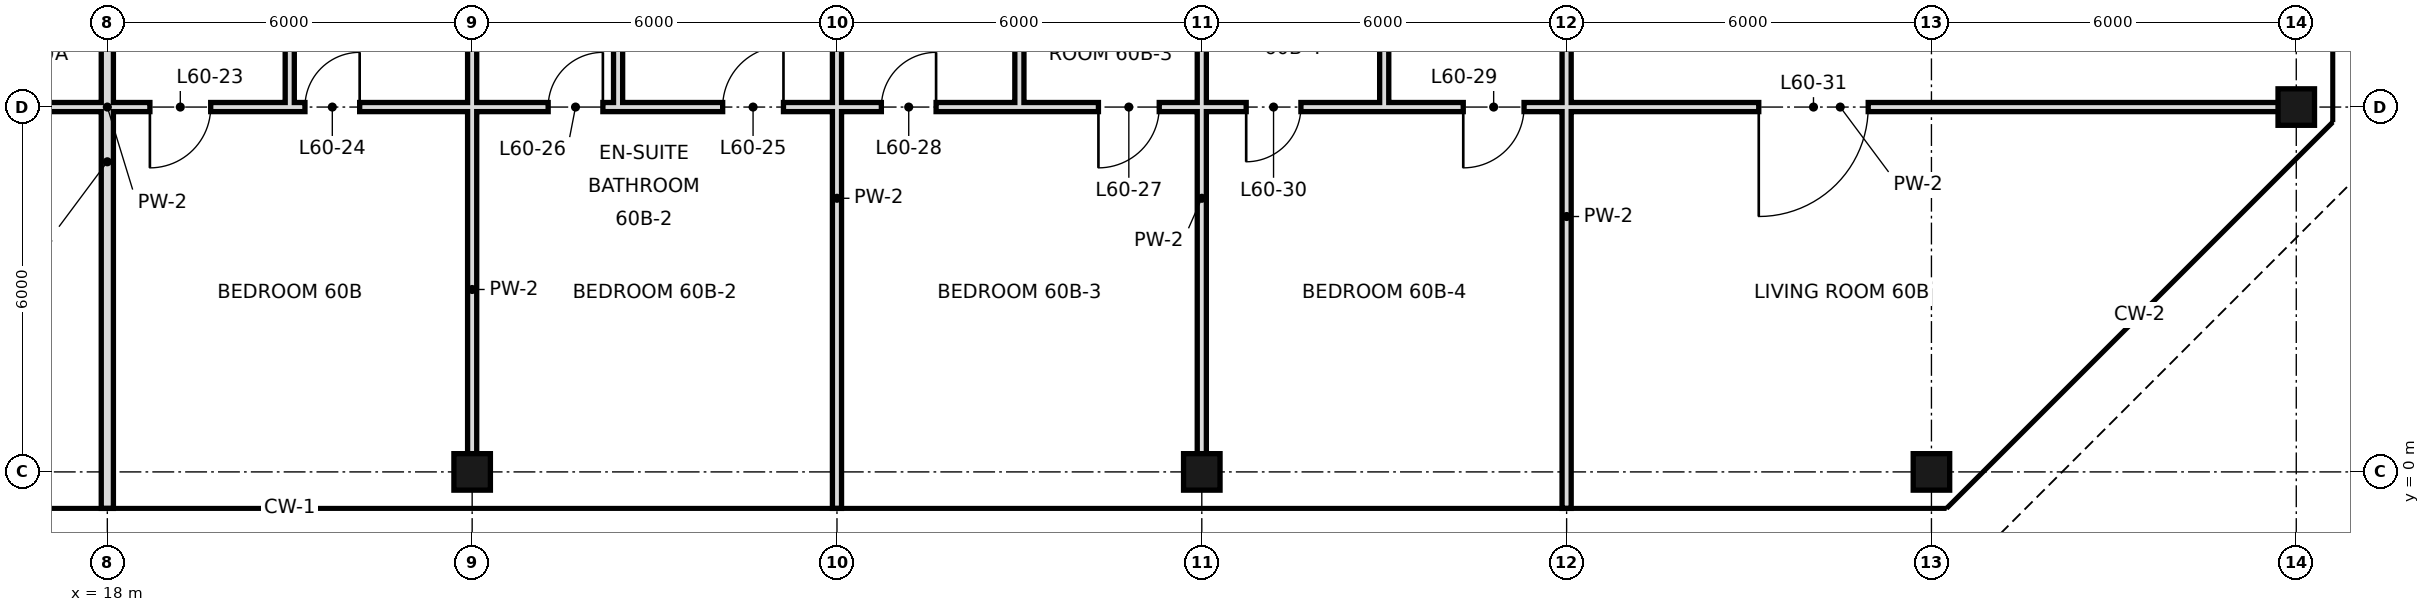
"""IFC4 building model, lengths in metres.
Left out: names, types, materials, properties, quantities, classifications, styles, units other than length and angle.
Written with IfcOpenShell. Run it as: python <this file> out.ifc"""

import sys

from ifc_helpers import new_model, si_unit, direction, frame, frame_2d, origin, origin_2d, place, context, subcontext, project, spatial, rectangle, hollow_rectangle, extrude, element, fill, save


model = new_model("IFC4")
c1 = context("Model", 3, precision=1e-05, world=origin(), true_north=direction((0.0, 1.0)))
c2 = subcontext(c1, "Body", "Model", "MODEL_VIEW")
j1 = project(units=[si_unit("LENGTHUNIT", "METRE"), si_unit("PLANEANGLEUNIT", "RADIAN")], contexts=[c1])
p1 = place(None, origin())
s1 = spatial("IfcSite", under=j1, at=p1, CompositionType="ELEMENT")
p2 = place(p1, origin())
s2 = spatial("IfcBuilding", under=s1, at=p2, CompositionType="ELEMENT")
p3 = place(p2, frame((0.0, 0.0, 254.0)))
s3 = spatial("IfcBuildingStorey", under=s2, at=p3, CompositionType="ELEMENT", Elevation=254.0)
for number, where, z_axis, x_axis in (
    (1, (24.0, 0.0, 0.0), (0.0, 0.0, 1.0), (1.0, 0.0, 0.0)),
    (2, (36.0, 0.0, 0.0), (0.0, 0.0, 1.0), (1.0, 0.0, 0.0)),
    (3, (48.0, 0.0, 0.0), (0.0, 0.0, 1.0), (1.0, 0.0, 0.0)),
    (4, (54.0, 6.0, 0.0), (0.0, 0.0, 1.0), (1.0, 0.0, 0.0)),
):
    element("IfcColumn", number, at=place(p3, frame(where, z_axis=z_axis, x_axis=x_axis)), inside=s3, PredefinedType="COLUMN", context=c2, shape_type="SweptSolid", body=[
        extrude(hollow_rectangle(XDim=0.6, YDim=0.6, WallThickness=0.028, at=origin_2d()), origin(), (0.0, 0.0, 1.0), 3.6),
    ])
p4 = place(p3, frame((18.0, -0.6, 0.0), z_axis=(0.0, 0.0, 1.0), x_axis=(0.0, 1.0, 0.0)))
e5 = element("IfcWall", 5, at=p4, inside=s3, PredefinedType="SOLIDWALL", context=c2, shape_type="SweptSolid", body=[
    extrude(rectangle(XDim=11.4, YDim=0.2, at=frame_2d((5.7, 0.0))), origin(), (0.0, 0.0, 1.0), 2.68),
])
p5 = place(p3, frame((21.0, 6.0, 0.0), z_axis=(0.0, 0.0, 1.0), x_axis=(0.0, 1.0, 0.0)))
e6 = element("IfcWall", 6, at=p5, inside=s3, PredefinedType="PARTITIONING", context=c2, shape_type="SweptSolid", body=[
    extrude(rectangle(XDim=3.0, YDim=0.15, at=frame_2d((1.5, 0.0))), origin(), (0.0, 0.0, 1.0), 3.38),
])
p6 = place(p3, frame((24.0, 0.0, 0.0), z_axis=(0.0, 0.0, 1.0), x_axis=(0.0, 1.0, 0.0)))
e7 = element("IfcWall", 7, at=p6, inside=s3, PredefinedType="PARTITIONING", context=c2, shape_type="SweptSolid", body=[
    extrude(rectangle(XDim=6.0, YDim=0.15, at=frame_2d((3.0, 0.0))), origin(), (0.0, 0.0, 1.0), 2.68),
])
p7 = place(p3, frame((24.0, 6.0, 0.0), z_axis=(0.0, 0.0, 1.0), x_axis=(0.0, 1.0, 0.0)))
e8 = element("IfcWall", 8, at=p7, inside=s3, PredefinedType="PARTITIONING", context=c2, shape_type="SweptSolid", body=[
    extrude(rectangle(XDim=3.0, YDim=0.15, at=frame_2d((1.5, 0.0))), origin(), (0.0, 0.0, 1.0), 2.68),
])
p8 = place(p3, frame((26.4, 6.0, 0.0), z_axis=(0.0, 0.0, 1.0), x_axis=(0.0, 1.0, 0.0)))
e9 = element("IfcWall", 9, at=p8, inside=s3, PredefinedType="PARTITIONING", context=c2, shape_type="SweptSolid", body=[
    extrude(rectangle(XDim=3.0, YDim=0.15, at=frame_2d((1.5, 0.0))), origin(), (0.0, 0.0, 1.0), 3.38),
])
p9 = place(p3, frame((30.0, -0.6, 0.0), z_axis=(0.0, 0.0, 1.0), x_axis=(0.0, 1.0, 0.0)))
e10 = element("IfcWall", 10, at=p9, inside=s3, PredefinedType="PARTITIONING", context=c2, shape_type="SweptSolid", body=[
    extrude(rectangle(XDim=6.6, YDim=0.15, at=frame_2d((3.3, 0.0))), origin(), (0.0, 0.0, 1.0), 2.68),
])
p10 = place(p3, frame((30.0, 6.0, 0.0), z_axis=(0.0, 0.0, 1.0), x_axis=(0.0, 1.0, 0.0)))
e11 = element("IfcWall", 11, at=p10, inside=s3, PredefinedType="PARTITIONING", context=c2, shape_type="SweptSolid", body=[
    extrude(rectangle(XDim=3.0, YDim=0.15, at=frame_2d((1.5, 0.0))), origin(), (0.0, 0.0, 1.0), 2.68),
])
p11 = place(p3, frame((33.0, 6.0, 0.0), z_axis=(0.0, 0.0, 1.0), x_axis=(0.0, 1.0, 0.0)))
e12 = element("IfcWall", 12, at=p11, inside=s3, PredefinedType="PARTITIONING", context=c2, shape_type="SweptSolid", body=[
    extrude(rectangle(XDim=3.0, YDim=0.15, at=frame_2d((1.5, 0.0))), origin(), (0.0, 0.0, 1.0), 3.38),
])
p12 = place(p3, frame((36.0, 0.0, 0.0), z_axis=(0.0, 0.0, 1.0), x_axis=(0.0, 1.0, 0.0)))
e13 = element("IfcWall", 13, at=p12, inside=s3, PredefinedType="PARTITIONING", context=c2, shape_type="SweptSolid", body=[
    extrude(rectangle(XDim=6.0, YDim=0.15, at=frame_2d((3.0, 0.0))), origin(), (0.0, 0.0, 1.0), 2.68),
])
p13 = place(p3, frame((36.0, 6.0, 0.0), z_axis=(0.0, 0.0, 1.0), x_axis=(0.0, 1.0, 0.0)))
e14 = element("IfcWall", 14, at=p13, inside=s3, PredefinedType="PARTITIONING", context=c2, shape_type="SweptSolid", body=[
    extrude(rectangle(XDim=3.0, YDim=0.15, at=frame_2d((1.5, 0.0))), origin(), (0.0, 0.0, 1.0), 2.68),
])
p14 = place(p3, frame((39.0, 6.0, 0.0), z_axis=(0.0, 0.0, 1.0), x_axis=(0.0, 1.0, 0.0)))
e15 = element("IfcWall", 15, at=p14, inside=s3, PredefinedType="PARTITIONING", context=c2, shape_type="SweptSolid", body=[
    extrude(rectangle(XDim=3.0, YDim=0.15, at=frame_2d((1.5, 0.0))), origin(), (0.0, 0.0, 1.0), 3.38),
])
p15 = place(p3, frame((42.0, -0.6, 0.0), z_axis=(0.0, 0.0, 1.0), x_axis=(0.0, 1.0, 0.0)))
e16 = element("IfcWall", 16, at=p15, inside=s3, PredefinedType="PARTITIONING", context=c2, shape_type="SweptSolid", body=[
    extrude(rectangle(XDim=9.6, YDim=0.15, at=frame_2d((4.8, 0.0))), origin(), (0.0, 0.0, 1.0), 2.68),
])
p16 = place(p3, frame((15.0, 6.0, 0.0), z_axis=(0.0, 0.0, 1.0), x_axis=(1.0, 0.0, 0.0)))
e17 = element("IfcWall", 17, at=p16, inside=s3, PredefinedType="PARTITIONING", context=c2, shape_type="SweptSolid", body=[
    extrude(rectangle(XDim=6.0, YDim=0.15, at=frame_2d((3.0, 0.0))), origin(), (0.0, 0.0, 1.0), 2.93),
])
p17 = place(p16, frame((1.0, 0.0, 0.0)))
e18 = element("IfcOpeningElement", 18, at=p17, cuts=e17, PredefinedType="OPENING", context=c2, shape_type="SweptSolid", body=[
    extrude(rectangle(XDim=1.0, YDim=2.4, at=frame_2d((0.5, 1.2))), frame((0.0, 0.085, 0.0), z_axis=(0.0, -1.0, 0.0), x_axis=(1.0, 0.0, 0.0)), (0.0, 0.0, 1.0), 0.17),
])
p18 = place(p16, frame((3.7, 0.0, 0.0)))
e19 = element("IfcOpeningElement", 19, at=p18, cuts=e17, PredefinedType="OPENING", context=c2, shape_type="SweptSolid", body=[
    extrude(rectangle(XDim=1.0, YDim=2.4, at=frame_2d((0.5, 1.2))), frame((0.0, 0.085, 0.0), z_axis=(0.0, -1.0, 0.0), x_axis=(1.0, 0.0, 0.0)), (0.0, 0.0, 1.0), 0.17),
])
p19 = place(p3, frame((26.4, 6.0, 0.0), z_axis=(0.0, 0.0, 1.0), x_axis=(1.0, 0.0, 0.0)))
e20 = element("IfcWall", 20, at=p19, inside=s3, PredefinedType="PARTITIONING", context=c2, shape_type="SweptSolid", body=[
    extrude(rectangle(XDim=3.6, YDim=0.15, at=frame_2d((1.8, 0.0))), origin(), (0.0, 0.0, 1.0), 2.93),
])
p20 = place(p19, frame((1.72, 0.0, 0.0)))
e21 = element("IfcOpeningElement", 21, at=p20, cuts=e20, PredefinedType="OPENING", context=c2, shape_type="SweptSolid", body=[
    extrude(rectangle(XDim=1.0, YDim=2.4, at=frame_2d((0.5, 1.2))), frame((0.0, 0.085, 0.0), z_axis=(0.0, -1.0, 0.0), x_axis=(1.0, 0.0, 0.0)), (0.0, 0.0, 1.0), 0.17),
])
p21 = place(p3, frame((33.0, 6.0, 0.0), z_axis=(0.0, 0.0, 1.0), x_axis=(1.0, 0.0, 0.0)))
e22 = element("IfcWall", 22, at=p21, inside=s3, PredefinedType="PARTITIONING", context=c2, shape_type="SweptSolid", body=[
    extrude(rectangle(XDim=3.0, YDim=0.15, at=frame_2d((1.5, 0.0))), origin(), (0.0, 0.0, 1.0), 2.93),
])
p22 = place(p21, frame((1.3, 0.0, 0.0)))
e23 = element("IfcOpeningElement", 23, at=p22, cuts=e22, PredefinedType="OPENING", context=c2, shape_type="SweptSolid", body=[
    extrude(rectangle(XDim=1.0, YDim=2.4, at=frame_2d((0.5, 1.2))), frame((0.0, 0.085, 0.0), z_axis=(0.0, -1.0, 0.0), x_axis=(1.0, 0.0, 0.0)), (0.0, 0.0, 1.0), 0.17),
])
p23 = place(p3, frame((39.0, 6.0, 0.0), z_axis=(0.0, 0.0, 1.0), x_axis=(1.0, 0.0, 0.0)))
e24 = element("IfcWall", 24, at=p23, inside=s3, PredefinedType="PARTITIONING", context=c2, shape_type="SweptSolid", body=[
    extrude(rectangle(XDim=15.0, YDim=0.15, at=frame_2d((7.5, 0.0))), origin(), (0.0, 0.0, 1.0), 2.93),
])
p24 = place(p23, frame((1.3, 0.0, 0.0)))
e25 = element("IfcOpeningElement", 25, at=p24, cuts=e24, PredefinedType="OPENING", context=c2, shape_type="SweptSolid", body=[
    extrude(rectangle(XDim=1.0, YDim=2.4, at=frame_2d((0.5, 1.2))), frame((0.0, 0.085, 0.0), z_axis=(0.0, -1.0, 0.0), x_axis=(1.0, 0.0, 0.0)), (0.0, 0.0, 1.0), 0.17),
])
p25 = place(p23, frame((6.16, 0.0, 0.0)))
e26 = element("IfcOpeningElement", 26, at=p25, cuts=e24, PredefinedType="OPENING", context=c2, shape_type="SweptSolid", body=[
    extrude(rectangle(XDim=1.8, YDim=2.4, at=frame_2d((0.9, 1.2))), frame((0.0, 0.085, 0.0), z_axis=(0.0, -1.0, 0.0), x_axis=(1.0, 0.0, 0.0)), (0.0, 0.0, 1.0), 0.17),
])
p26 = place(p3, frame((21.0, 6.0, 0.0), z_axis=(0.0, 0.0, 1.0), x_axis=(1.0, 0.0, 0.0)))
e27 = element("IfcWall", 27, at=p26, inside=s3, PredefinedType="PARTITIONING", context=c2, shape_type="SweptSolid", body=[
    extrude(rectangle(XDim=5.4, YDim=0.15, at=frame_2d((2.7, 0.0))), origin(), (0.0, 0.0, 1.0), 2.93),
])
p27 = place(p26, frame((0.25, 0.0, 0.0)))
e28 = element("IfcOpeningElement", 28, at=p27, cuts=e27, PredefinedType="OPENING", context=c2, shape_type="SweptSolid", body=[
    extrude(rectangle(XDim=0.9, YDim=2.4, at=frame_2d((0.45, 1.2))), frame((0.0, 0.085, 0.0), z_axis=(0.0, -1.0, 0.0), x_axis=(1.0, 0.0, 0.0)), (0.0, 0.0, 1.0), 0.17),
])
p28 = place(p26, frame((4.25, 0.0, 0.0)))
e29 = element("IfcOpeningElement", 29, at=p28, cuts=e27, PredefinedType="OPENING", context=c2, shape_type="SweptSolid", body=[
    extrude(rectangle(XDim=0.9, YDim=2.4, at=frame_2d((0.45, 1.2))), frame((0.0, 0.085, 0.0), z_axis=(0.0, -1.0, 0.0), x_axis=(1.0, 0.0, 0.0)), (0.0, 0.0, 1.0), 0.17),
])
p29 = place(p3, frame((30.0, 6.0, 0.0), z_axis=(0.0, 0.0, 1.0), x_axis=(1.0, 0.0, 0.0)))
e30 = element("IfcWall", 30, at=p29, inside=s3, PredefinedType="PARTITIONING", context=c2, shape_type="SweptSolid", body=[
    extrude(rectangle(XDim=3.0, YDim=0.15, at=frame_2d((1.5, 0.0))), origin(), (0.0, 0.0, 1.0), 2.93),
])
p30 = place(p29, frame((0.73, 0.0, 0.0)))
e31 = element("IfcOpeningElement", 31, at=p30, cuts=e30, PredefinedType="OPENING", context=c2, shape_type="SweptSolid", body=[
    extrude(rectangle(XDim=0.9, YDim=2.4, at=frame_2d((0.45, 1.2))), frame((0.0, 0.085, 0.0), z_axis=(0.0, -1.0, 0.0), x_axis=(1.0, 0.0, 0.0)), (0.0, 0.0, 1.0), 0.17),
])
p31 = place(p3, frame((36.0, 6.0, 0.0), z_axis=(0.0, 0.0, 1.0), x_axis=(1.0, 0.0, 0.0)))
e32 = element("IfcWall", 32, at=p31, inside=s3, PredefinedType="PARTITIONING", context=c2, shape_type="SweptSolid", body=[
    extrude(rectangle(XDim=3.0, YDim=0.15, at=frame_2d((1.5, 0.0))), origin(), (0.0, 0.0, 1.0), 2.93),
])
p32 = place(p31, frame((0.73, 0.0, 0.0)))
e33 = element("IfcOpeningElement", 33, at=p32, cuts=e32, PredefinedType="OPENING", context=c2, shape_type="SweptSolid", body=[
    extrude(rectangle(XDim=0.9, YDim=2.4, at=frame_2d((0.45, 1.2))), frame((0.0, 0.085, 0.0), z_axis=(0.0, -1.0, 0.0), x_axis=(1.0, 0.0, 0.0)), (0.0, 0.0, 1.0), 0.17),
])
p33 = place(p18, frame((1.0, 0.0, 0.0), z_axis=(0.0, 0.0, 1.0), x_axis=(-1.0, 0.0, 0.0)))
e34 = element("IfcDoor", 34, at=p33, inside=s3, OperationType="SINGLE_SWING_RIGHT", PredefinedType="DOOR", context=c2, shape_type="SweptSolid", body=[
    extrude(rectangle(XDim=1.0, YDim=2.4, at=frame_2d((0.5, 1.2))), frame((0.0, 0.025, 0.0), z_axis=(0.0, -1.0, 0.0), x_axis=(1.0, 0.0, 0.0)), (0.0, 0.0, 1.0), 0.05),
])
fill(e19, e34)
p34 = place(p27, frame((0.9, 0.0, 0.0), z_axis=(0.0, 0.0, 1.0), x_axis=(-1.0, 0.0, 0.0)))
e35 = element("IfcDoor", 35, at=p34, inside=s3, OperationType="SINGLE_SWING_LEFT", PredefinedType="DOOR", context=c2, shape_type="SweptSolid", body=[
    extrude(rectangle(XDim=0.9, YDim=2.4, at=frame_2d((0.45, 1.2))), frame((0.0, 0.025, 0.0), z_axis=(0.0, -1.0, 0.0), x_axis=(1.0, 0.0, 0.0)), (0.0, 0.0, 1.0), 0.05),
])
fill(e28, e35)
p35 = place(p20, frame((1.0, 0.0, 0.0), z_axis=(0.0, 0.0, 1.0), x_axis=(-1.0, 0.0, 0.0)))
e36 = element("IfcDoor", 36, at=p35, inside=s3, OperationType="SINGLE_SWING_LEFT", PredefinedType="DOOR", context=c2, shape_type="SweptSolid", body=[
    extrude(rectangle(XDim=1.0, YDim=2.4, at=frame_2d((0.5, 1.2))), frame((0.0, 0.025, 0.0), z_axis=(0.0, -1.0, 0.0), x_axis=(1.0, 0.0, 0.0)), (0.0, 0.0, 1.0), 0.05),
])
fill(e21, e36)
p36 = place(p28, frame((0.9, 0.0, 0.0), z_axis=(0.0, 0.0, 1.0), x_axis=(-1.0, 0.0, 0.0)))
e37 = element("IfcDoor", 37, at=p36, inside=s3, OperationType="SINGLE_SWING_LEFT", PredefinedType="DOOR", context=c2, shape_type="SweptSolid", body=[
    extrude(rectangle(XDim=0.9, YDim=2.4, at=frame_2d((0.45, 1.2))), frame((0.0, 0.025, 0.0), z_axis=(0.0, -1.0, 0.0), x_axis=(1.0, 0.0, 0.0)), (0.0, 0.0, 1.0), 0.05),
])
fill(e29, e37)
p37 = place(p22, frame((1.0, 0.0, 0.0), z_axis=(0.0, 0.0, 1.0), x_axis=(-1.0, 0.0, 0.0)))
e38 = element("IfcDoor", 38, at=p37, inside=s3, OperationType="SINGLE_SWING_RIGHT", PredefinedType="DOOR", context=c2, shape_type="SweptSolid", body=[
    extrude(rectangle(XDim=1.0, YDim=2.4, at=frame_2d((0.5, 1.2))), frame((0.0, 0.025, 0.0), z_axis=(0.0, -1.0, 0.0), x_axis=(1.0, 0.0, 0.0)), (0.0, 0.0, 1.0), 0.05),
])
fill(e23, e38)
p38 = place(p30, frame((0.9, 0.0, 0.0), z_axis=(0.0, 0.0, 1.0), x_axis=(-1.0, 0.0, 0.0)))
e39 = element("IfcDoor", 39, at=p38, inside=s3, OperationType="SINGLE_SWING_LEFT", PredefinedType="DOOR", context=c2, shape_type="SweptSolid", body=[
    extrude(rectangle(XDim=0.9, YDim=2.4, at=frame_2d((0.45, 1.2))), frame((0.0, 0.025, 0.0), z_axis=(0.0, -1.0, 0.0), x_axis=(1.0, 0.0, 0.0)), (0.0, 0.0, 1.0), 0.05),
])
fill(e31, e39)
p39 = place(p24, frame((1.0, 0.0, 0.0), z_axis=(0.0, 0.0, 1.0), x_axis=(-1.0, 0.0, 0.0)))
e40 = element("IfcDoor", 40, at=p39, inside=s3, OperationType="SINGLE_SWING_RIGHT", PredefinedType="DOOR", context=c2, shape_type="SweptSolid", body=[
    extrude(rectangle(XDim=1.0, YDim=2.4, at=frame_2d((0.5, 1.2))), frame((0.0, 0.025, 0.0), z_axis=(0.0, -1.0, 0.0), x_axis=(1.0, 0.0, 0.0)), (0.0, 0.0, 1.0), 0.05),
])
fill(e25, e40)
p40 = place(p32, frame((0.9, 0.0, 0.0), z_axis=(0.0, 0.0, 1.0), x_axis=(-1.0, 0.0, 0.0)))
e41 = element("IfcDoor", 41, at=p40, inside=s3, OperationType="SINGLE_SWING_RIGHT", PredefinedType="DOOR", context=c2, shape_type="SweptSolid", body=[
    extrude(rectangle(XDim=0.9, YDim=2.4, at=frame_2d((0.45, 1.2))), frame((0.0, 0.025, 0.0), z_axis=(0.0, -1.0, 0.0), x_axis=(1.0, 0.0, 0.0)), (0.0, 0.0, 1.0), 0.05),
])
fill(e33, e41)
p41 = place(p25, frame((1.8, 0.0, 0.0), z_axis=(0.0, 0.0, 1.0), x_axis=(-1.0, 0.0, 0.0)))
e42 = element("IfcDoor", 42, at=p41, inside=s3, OperationType="SINGLE_SWING_RIGHT", PredefinedType="DOOR", context=c2, shape_type="SweptSolid", body=[
    extrude(rectangle(XDim=1.8, YDim=2.4, at=frame_2d((0.9, 1.2))), frame((0.0, 0.025, 0.0), z_axis=(0.0, -1.0, 0.0), x_axis=(1.0, 0.0, 0.0)), (0.0, 0.0, 1.0), 0.05),
])
fill(e26, e42)
save(model, sys.argv[1])
